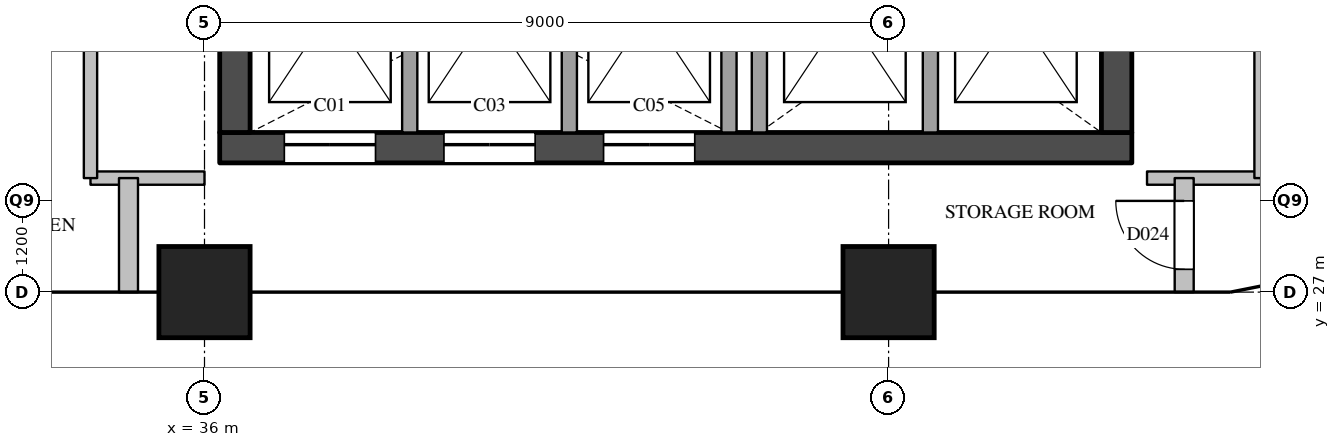
"""IFC4 building model, lengths in metres.
Left out: names, types, materials, properties, quantities, classifications, styles, units other than length and angle.
Written with IfcOpenShell. Run it as: python <this file> out.ifc"""

import sys

from ifc_helpers import new_model, si_unit, direction, frame, frame_2d, origin, origin_2d, place, context, subcontext, project, spatial, rectangle, extrude, element, fill, save


model = new_model("IFC4")
c1 = context("Model", 3, precision=1e-05, world=origin(), true_north=direction((0.0, 1.0)))
c2 = subcontext(c1, "Body", "Model", "MODEL_VIEW")
j1 = project(units=[si_unit("LENGTHUNIT", "METRE"), si_unit("PLANEANGLEUNIT", "RADIAN")], contexts=[c1])
p1 = place(None, origin())
s1 = spatial("IfcSite", under=j1, at=p1, CompositionType="ELEMENT")
p2 = place(p1, origin())
s2 = spatial("IfcBuilding", under=s1, at=p2, CompositionType="ELEMENT")
p3 = place(p2, frame((0.0, 0.0, 242.3)))
s3 = spatial("IfcBuildingStorey", under=s2, at=p3, CompositionType="ELEMENT", Elevation=242.3)
for number, where, z_axis, x_axis in (
    (1, (36.0, 27.0, 0.0), (0.0, 0.0, 1.0), (1.0, 0.0, 0.0)),
    (2, (45.0, 27.0, 0.0), (0.0, 0.0, 1.0), (1.0, 0.0, 0.0)),
):
    element("IfcColumn", number, at=place(p3, frame(where, z_axis=z_axis, x_axis=x_axis)), inside=s3, PredefinedType="COLUMN", context=c2, shape_type="SweptSolid", body=[
        extrude(rectangle(XDim=1.2, YDim=1.2, at=origin_2d()), origin(), (0.0, 0.0, 1.0), 3.9),
    ])
p4 = place(p3, frame((36.2, 28.9, 0.0), z_axis=(0.0, 0.0, 1.0), x_axis=(1.0, 0.0, 0.0)))
e3 = element("IfcWall", 3, at=p4, inside=s3, PredefinedType="SHEAR", context=c2, shape_type="SweptSolid", body=[
    extrude(rectangle(XDim=12.0, YDim=0.4, at=frame_2d((6.0, 0.0))), origin(), (0.0, 0.0, 1.0), 3.6),
])
p5 = place(p4, frame((0.85, 0.0, 0.0)))
e4 = element("IfcOpeningElement", 4, at=p5, cuts=e3, PredefinedType="OPENING", context=c2, shape_type="SweptSolid", body=[
    extrude(rectangle(XDim=1.2, YDim=2.1, at=frame_2d((0.6, 1.05))), frame((0.0, 0.21, 0.0), z_axis=(0.0, -1.0, 0.0), x_axis=(1.0, 0.0, 0.0)), (0.0, 0.0, 1.0), 0.42),
])
p6 = place(p4, frame((2.95, 0.0, 0.0)))
e5 = element("IfcOpeningElement", 5, at=p6, cuts=e3, PredefinedType="OPENING", context=c2, shape_type="SweptSolid", body=[
    extrude(rectangle(XDim=1.2, YDim=2.1, at=frame_2d((0.6, 1.05))), frame((0.0, 0.21, 0.0), z_axis=(0.0, -1.0, 0.0), x_axis=(1.0, 0.0, 0.0)), (0.0, 0.0, 1.0), 0.42),
])
p7 = place(p4, frame((5.05, 0.0, 0.0)))
e6 = element("IfcOpeningElement", 6, at=p7, cuts=e3, PredefinedType="OPENING", context=c2, shape_type="SweptSolid", body=[
    extrude(rectangle(XDim=1.2, YDim=2.1, at=frame_2d((0.6, 1.05))), frame((0.0, 0.21, 0.0), z_axis=(0.0, -1.0, 0.0), x_axis=(1.0, 0.0, 0.0)), (0.0, 0.0, 1.0), 0.42),
])
p8 = place(p3, frame((36.4, 29.1, 0.0), z_axis=(0.0, 0.0, 1.0), x_axis=(0.0, 1.0, 0.0)))
e7 = element("IfcWall", 7, at=p8, inside=s3, PredefinedType="SHEAR", context=c2, shape_type="SweptSolid", body=[
    extrude(rectangle(XDim=20.3, YDim=0.4, at=frame_2d((10.15, 0.0))), origin(), (0.0, 0.0, 1.0), 3.6),
])
p9 = place(p8, frame((3.6, 0.0, 0.0)))
e8 = element("IfcOpeningElement", 8, at=p9, cuts=e7, PredefinedType="OPENING", context=c2, shape_type="SweptSolid", body=[
    extrude(rectangle(XDim=1.8, YDim=2.1, at=frame_2d((0.9, 1.05))), frame((0.0, 0.21, 0.0), z_axis=(0.0, -1.0, 0.0), x_axis=(1.0, 0.0, 0.0)), (0.0, 0.0, 1.0), 0.42),
])
p10 = place(p8, frame((16.4, 0.0, 0.0)))
e9 = element("IfcOpeningElement", 9, at=p10, cuts=e7, PredefinedType="OPENING", context=c2, shape_type="SweptSolid", body=[
    extrude(rectangle(XDim=1.0, YDim=2.1, at=frame_2d((0.5, 1.05))), frame((0.0, 0.21, 0.0), z_axis=(0.0, -1.0, 0.0), x_axis=(1.0, 0.0, 0.0)), (0.0, 0.0, 1.0), 0.42),
])
p11 = place(p3, frame((48.0, 29.1, 0.0), z_axis=(0.0, 0.0, 1.0), x_axis=(0.0, 1.0, 0.0)))
e10 = element("IfcWall", 10, at=p11, inside=s3, PredefinedType="SHEAR", context=c2, shape_type="SweptSolid", body=[
    extrude(rectangle(XDim=20.3, YDim=0.4, at=frame_2d((10.15, 0.0))), origin(), (0.0, 0.0, 1.0), 3.6),
])
p12 = place(p11, frame((12.5, 0.0, 0.0)))
e11 = element("IfcOpeningElement", 11, at=p12, cuts=e10, PredefinedType="OPENING", context=c2, shape_type="SweptSolid", body=[
    extrude(rectangle(XDim=0.7, YDim=2.1, at=frame_2d((0.35, 1.05))), frame((0.0, 0.21, 0.0), z_axis=(0.0, -1.0, 0.0), x_axis=(1.0, 0.0, 0.0)), (0.0, 0.0, 1.0), 0.42),
])
p13 = place(p11, frame((3.9, 0.0, 0.0)))
e12 = element("IfcOpeningElement", 12, at=p13, cuts=e10, PredefinedType="OPENING", context=c2, shape_type="SweptSolid", body=[
    extrude(rectangle(XDim=1.8, YDim=2.1, at=frame_2d((0.9, 1.05))), frame((0.0, 0.21, 0.0), z_axis=(0.0, -1.0, 0.0), x_axis=(1.0, 0.0, 0.0)), (0.0, 0.0, 1.0), 0.42),
])
for number, where, z_axis, x_axis in (
    (13, (38.7, 29.1, 0.0), (0.0, 0.0, 1.0), (0.0, 1.0, 0.0)),
    (14, (40.8, 29.1, 0.0), (0.0, 0.0, 1.0), (0.0, 1.0, 0.0)),
    (15, (42.9, 29.1, 0.0), (0.0, 0.0, 1.0), (0.0, 1.0, 0.0)),
):
    element("IfcWall", number, at=place(p3, frame(where, z_axis=z_axis, x_axis=x_axis)), inside=s3, PredefinedType="SOLIDWALL", context=c2, shape_type="SweptSolid", body=[
        extrude(rectangle(XDim=3.2, YDim=0.2, at=frame_2d((1.6, 0.0))), origin(), (0.0, 0.0, 1.0), 3.6),
    ])
p14 = place(p3, frame((43.3, 29.1, 0.0), z_axis=(0.0, 0.0, 1.0), x_axis=(0.0, 1.0, 0.0)))
e16 = element("IfcWall", 16, at=p14, inside=s3, PredefinedType="SOLIDWALL", context=c2, shape_type="SweptSolid", body=[
    extrude(rectangle(XDim=9.9, YDim=0.2, at=frame_2d((4.95, 0.0))), origin(), (0.0, 0.0, 1.0), 3.6),
])
p15 = place(p3, frame((45.55, 29.1, 0.0), z_axis=(0.0, 0.0, 1.0), x_axis=(0.0, 1.0, 0.0)))
e17 = element("IfcWall", 17, at=p15, inside=s3, PredefinedType="SOLIDWALL", context=c2, shape_type="SweptSolid", body=[
    extrude(rectangle(XDim=3.2, YDim=0.2, at=frame_2d((1.6, 0.0))), origin(), (0.0, 0.0, 1.0), 3.6),
])
for number, where, z_axis, x_axis in (
    (18, (34.5, 28.5, 0.0), (0.0, 0.0, 1.0), (1.0, 0.0, 0.0)),
    (19, (48.4, 28.5, 0.0), (0.0, 0.0, 1.0), (1.0, 0.0, 0.0)),
):
    element("IfcWall", number, at=place(p3, frame(where, z_axis=z_axis, x_axis=x_axis)), inside=s3, PredefinedType="PARTITIONING", context=c2, shape_type="SweptSolid", body=[
        extrude(rectangle(XDim=1.5, YDim=0.175, at=frame_2d((0.75, 0.0))), origin(), (0.0, 0.0, 1.0), 3.6),
    ])
p16 = place(p3, frame((34.5, 28.5, 0.0), z_axis=(0.0, 0.0, 1.0), x_axis=(0.0, 1.0, 0.0)))
e20 = element("IfcWall", 20, at=p16, inside=s3, PredefinedType="PARTITIONING", context=c2, shape_type="SweptSolid", body=[
    extrude(rectangle(XDim=23.0, YDim=0.175, at=frame_2d((11.5, 0.0))), origin(), (0.0, 0.0, 1.0), 3.6),
])
p17 = place(p16, frame((5.1, 0.0, 0.0)))
e21 = element("IfcOpeningElement", 21, at=p17, cuts=e20, PredefinedType="OPENING", context=c2, shape_type="SweptSolid", body=[
    extrude(rectangle(XDim=1.0, YDim=2.1, at=frame_2d((0.5, 1.05))), frame((0.0, 0.097, 0.0), z_axis=(0.0, -1.0, 0.0), x_axis=(1.0, 0.0, 0.0)), (0.0, 0.0, 1.0), 0.195),
])
p18 = place(p16, frame((6.9, 0.0, 0.0)))
e22 = element("IfcOpeningElement", 22, at=p18, cuts=e20, PredefinedType="OPENING", context=c2, shape_type="SweptSolid", body=[
    extrude(rectangle(XDim=1.0, YDim=2.1, at=frame_2d((0.5, 1.05))), frame((0.0, 0.097, 0.0), z_axis=(0.0, -1.0, 0.0), x_axis=(1.0, 0.0, 0.0)), (0.0, 0.0, 1.0), 0.195),
])
p19 = place(p16, frame((16.9, 0.0, 0.0)))
e23 = element("IfcOpeningElement", 23, at=p19, cuts=e20, PredefinedType="OPENING", context=c2, shape_type="SweptSolid", body=[
    extrude(rectangle(XDim=1.0, YDim=2.1, at=frame_2d((0.5, 1.05))), frame((0.0, 0.097, 0.0), z_axis=(0.0, -1.0, 0.0), x_axis=(1.0, 0.0, 0.0)), (0.0, 0.0, 1.0), 0.195),
])
p20 = place(p3, frame((49.9, 28.5, 0.0), z_axis=(0.0, 0.0, 1.0), x_axis=(0.0, 1.0, 0.0)))
e24 = element("IfcWall", 24, at=p20, inside=s3, PredefinedType="PARTITIONING", context=c2, shape_type="SweptSolid", body=[
    extrude(rectangle(XDim=23.0, YDim=0.175, at=frame_2d((11.5, 0.0))), origin(), (0.0, 0.0, 1.0), 3.6),
])
p21 = place(p20, frame((5.3, 0.0, 0.0)))
e25 = element("IfcOpeningElement", 25, at=p21, cuts=e24, PredefinedType="OPENING", context=c2, shape_type="SweptSolid", body=[
    extrude(rectangle(XDim=0.9, YDim=2.1, at=frame_2d((0.45, 1.05))), frame((0.0, 0.097, 0.0), z_axis=(0.0, -1.0, 0.0), x_axis=(1.0, 0.0, 0.0)), (0.0, 0.0, 1.0), 0.195),
])
p22 = place(p20, frame((16.05, 0.0, 0.0)))
e26 = element("IfcOpeningElement", 26, at=p22, cuts=e24, PredefinedType="OPENING", context=c2, shape_type="SweptSolid", body=[
    extrude(rectangle(XDim=0.9, YDim=2.1, at=frame_2d((0.45, 1.05))), frame((0.0, 0.097, 0.0), z_axis=(0.0, -1.0, 0.0), x_axis=(1.0, 0.0, 0.0)), (0.0, 0.0, 1.0), 0.195),
])
p23 = place(p3, frame((35.0, 27.0, 0.0), z_axis=(0.0, 0.0, 1.0), x_axis=(0.0, 1.0, 0.0)))
e27 = element("IfcWall", 27, at=p23, inside=s3, PredefinedType="PARTITIONING", context=c2, shape_type="SweptSolid", body=[
    extrude(rectangle(XDim=1.5, YDim=0.25, at=frame_2d((0.75, 0.0))), origin(), (0.0, 0.0, 1.0), 2.6),
])
p24 = place(p3, frame((48.889, 27.0, 0.0), z_axis=(0.0, 0.0, 1.0), x_axis=(0.0, 1.0, 0.0)))
e28 = element("IfcWall", 28, at=p24, inside=s3, PredefinedType="PARTITIONING", context=c2, shape_type="SweptSolid", body=[
    extrude(rectangle(XDim=1.5, YDim=0.25, at=frame_2d((0.75, 0.0))), origin(), (0.0, 0.0, 1.0), 2.6),
])
p25 = place(p24, frame((0.3, 0.0, 0.0)))
e29 = element("IfcOpeningElement", 29, at=p25, cuts=e28, PredefinedType="OPENING", context=c2, shape_type="SweptSolid", body=[
    extrude(rectangle(XDim=0.9, YDim=2.1, at=frame_2d((0.45, 1.05))), frame((0.0, 0.135, 0.0), z_axis=(0.0, -1.0, 0.0), x_axis=(1.0, 0.0, 0.0)), (0.0, 0.0, 1.0), 0.27),
])
p26 = place(p5, origin())
e30 = element("IfcDoor", 30, at=p26, inside=s3, OperationType="SLIDING_TO_LEFT", PredefinedType="DOOR", context=c2, shape_type="SweptSolid", body=[
    extrude(rectangle(XDim=1.2, YDim=2.1, at=frame_2d((0.6, 1.05))), frame((0.0, 0.025, 0.0), z_axis=(0.0, -1.0, 0.0), x_axis=(1.0, 0.0, 0.0)), (0.0, 0.0, 1.0), 0.05),
])
fill(e4, e30)
p27 = place(p6, origin())
e31 = element("IfcDoor", 31, at=p27, inside=s3, OperationType="SLIDING_TO_LEFT", PredefinedType="DOOR", context=c2, shape_type="SweptSolid", body=[
    extrude(rectangle(XDim=1.2, YDim=2.1, at=frame_2d((0.6, 1.05))), frame((0.0, 0.025, 0.0), z_axis=(0.0, -1.0, 0.0), x_axis=(1.0, 0.0, 0.0)), (0.0, 0.0, 1.0), 0.05),
])
fill(e5, e31)
p28 = place(p7, origin())
e32 = element("IfcDoor", 32, at=p28, inside=s3, OperationType="SLIDING_TO_LEFT", PredefinedType="DOOR", context=c2, shape_type="SweptSolid", body=[
    extrude(rectangle(XDim=1.2, YDim=2.1, at=frame_2d((0.6, 1.05))), frame((0.0, 0.025, 0.0), z_axis=(0.0, -1.0, 0.0), x_axis=(1.0, 0.0, 0.0)), (0.0, 0.0, 1.0), 0.05),
])
fill(e6, e32)
p29 = place(p25, origin())
e33 = element("IfcDoor", 33, at=p29, inside=s3, OperationType="SINGLE_SWING_RIGHT", PredefinedType="DOOR", context=c2, shape_type="SweptSolid", body=[
    extrude(rectangle(XDim=0.9, YDim=2.1, at=frame_2d((0.45, 1.05))), frame((0.0, 0.025, 0.0), z_axis=(0.0, -1.0, 0.0), x_axis=(1.0, 0.0, 0.0)), (0.0, 0.0, 1.0), 0.05),
])
fill(e29, e33)
save(model, sys.argv[1])
